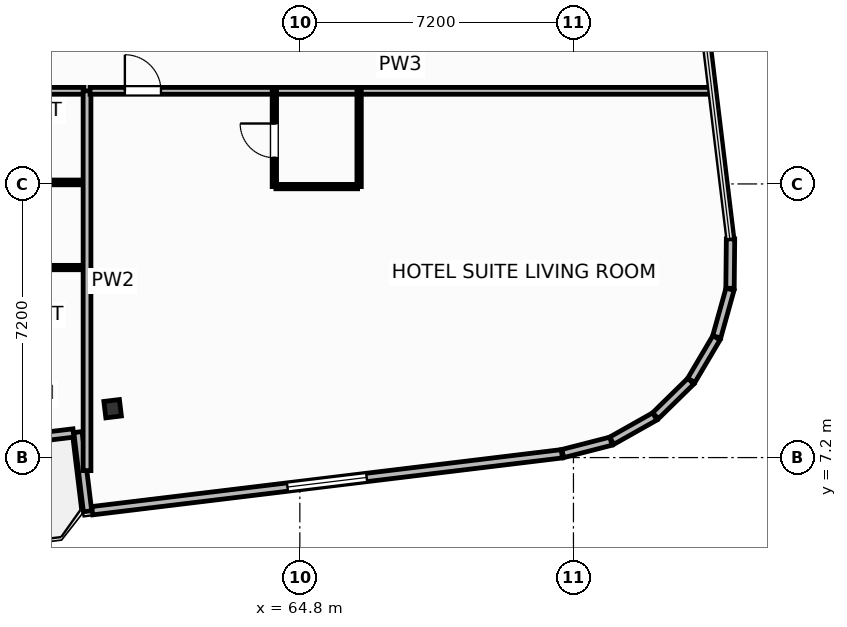
"""IFC4 building model, lengths in metres.
Left out: names, types, materials, properties, quantities, classifications, styles, units other than length and angle.
Written with IfcOpenShell. Run it as: python <this file> out.ifc"""

import sys

from ifc_helpers import new_model, si_unit, direction, frame, frame_2d, origin, origin_2d, place, context, subcontext, project, spatial, rectangle, i_section, extrude, element, fill, save


model = new_model("IFC4")
c1 = context("Model", 3, precision=1e-05, world=origin(), true_north=direction((0.0, 1.0)))
c2 = subcontext(c1, "Body", "Model", "MODEL_VIEW")
j1 = project(units=[si_unit("LENGTHUNIT", "METRE"), si_unit("PLANEANGLEUNIT", "RADIAN")], contexts=[c1])
p1 = place(None, origin())
s1 = spatial("IfcSite", under=j1, at=p1, CompositionType="ELEMENT")
p2 = place(p1, origin())
s2 = spatial("IfcBuilding", under=s1, at=p2, CompositionType="ELEMENT")
p3 = place(p2, frame((0.0, 0.0, 170.9)))
s3 = spatial("IfcBuildingStorey", under=s2, at=p3, CompositionType="ELEMENT", Elevation=170.9)
p4 = place(p3, frame((59.874, 8.486, 0.0), z_axis=(0.0, 0.0, 1.0), x_axis=(0.992732158755, 0.12034475881, 0.0)))
e1 = element("IfcColumn", 1, at=p4, inside=s3, PredefinedType="COLUMN", context=c2, shape_type="SweptSolid", body=[
    extrude(i_section(OverallWidth=0.412, OverallDepth=0.435, WebThickness=0.036, FlangeThickness=0.057, FilletRadius=0.025, at=origin_2d()), origin(), (0.0, 0.0, 1.0), 3.7),
])
p5 = place(p3, frame((58.843, 7.847, 0.0), z_axis=(0.0, 0.0, 1.0), x_axis=(-0.992729951822, -0.120362962556, 0.0)))
e2 = element("IfcWall", 2, at=p5, inside=s3, PredefinedType="SOLIDWALL", context=c2, shape_type="SweptSolid", body=[
    extrude(rectangle(XDim=6.0, YDim=0.22, at=frame_2d((3.0, 0.0))), origin(), (0.0, 0.0, 1.0), 2.73),
])
p6 = place(p5, frame((1.144, 0.0, 0.0)))
e3 = element("IfcOpeningElement", 3, at=p6, cuts=e2, PredefinedType="OPENING", context=c2, shape_type="SweptSolid", body=[
    extrude(rectangle(XDim=2.1, YDim=2.3, at=frame_2d((1.05, 1.15))), frame((0.0, 0.12, 0.0), z_axis=(0.0, -1.0, 0.0), x_axis=(1.0, 0.0, 0.0)), (0.0, 0.0, 1.0), 0.24),
])
p7 = place(p3, frame((58.961, 7.872, 0.0), z_axis=(0.0, 0.0, 1.0), x_axis=(0.120327895535, -0.992734202874, 0.0)))
e4 = element("IfcWall", 4, at=p7, inside=s3, PredefinedType="SOLIDWALL", context=c2, shape_type="SweptSolid", body=[
    extrude(rectangle(XDim=2.1, YDim=0.22, at=frame_2d((1.05, 0.0))), origin(), (0.0, 0.0, 1.0), 2.73),
])
p8 = place(p3, frame((59.338, 5.802, 0.0), z_axis=(0.0, 0.0, 1.0), x_axis=(0.992731225757, 0.120352454927, 0.0)))
e5 = element("IfcWall", 5, at=p8, inside=s3, PredefinedType="SOLIDWALL", context=c2, shape_type="SweptSolid", body=[
    extrude(rectangle(XDim=12.447, YDim=0.22, at=frame_2d((6.224, 0.0))), origin(), (0.0, 0.0, 1.0), 2.73),
])
p9 = place(p8, frame((5.174, 0.0, 0.8)))
e6 = element("IfcOpeningElement", 6, at=p9, cuts=e5, PredefinedType="OPENING", context=c2, shape_type="SweptSolid", body=[
    extrude(rectangle(XDim=2.1, YDim=1.75, at=frame_2d((1.05, 0.875))), frame((0.0, 0.12, 0.0), z_axis=(0.0, -1.0, 0.0), x_axis=(1.0, 0.0, 0.0)), (0.0, 0.0, 1.0), 0.24),
])
p10 = place(p3, frame((71.719, 7.306, 0.0), z_axis=(0.0, 0.0, 1.0), x_axis=(0.968541764193, 0.248851061909, 0.0)))
e7 = element("IfcWall", 7, at=p10, inside=s3, PredefinedType="SOLIDWALL", context=c2, shape_type="SweptSolid", body=[
    extrude(rectangle(XDim=1.309, YDim=0.22, at=frame_2d((0.654, 0.0))), origin(), (0.0, 0.0, 1.0), 2.73),
])
for number, where, z_axis, x_axis in (
    (8, (73.008, 7.644, 0.0), (0.0, 0.0, 1.0), (0.871, 0.491, 0.0)),
    (9, (74.159, 8.3, 0.0), (0.0, 0.0, 1.0), (0.714, 0.7, 0.0)),
    (10, (75.101, 9.232, 0.0), (0.0, 0.0, 1.0), (0.509, 0.861, 0.0)),
    (11, (75.77, 10.376, 0.0), (0.0, 0.0, 1.0), (0.269, 0.963, 0.0)),
):
    element("IfcWall", number, at=place(p3, frame(where, z_axis=z_axis, x_axis=x_axis)), inside=s3, PredefinedType="SOLIDWALL", context=c2, shape_type="SweptSolid", body=[
        extrude(rectangle(XDim=1.301, YDim=0.22, at=frame_2d((0.65, 0.0))), origin(), (0.0, 0.0, 1.0), 2.73),
    ])
p11 = place(p3, frame((76.12, 11.654, 0.0), z_axis=(0.0, 0.0, 1.0), x_axis=(0.01032033607, 0.999946743914, 0.0)))
e12 = element("IfcWall", 12, at=p11, inside=s3, PredefinedType="SOLIDWALL", context=c2, shape_type="SweptSolid", body=[
    extrude(rectangle(XDim=1.301, YDim=0.22, at=frame_2d((0.65, 0.0))), origin(), (0.0, 0.0, 1.0), 2.73),
])
p12 = place(p3, frame((48.48, 16.85, 0.0), z_axis=(0.0, 0.0, 1.0), x_axis=(1.0, 0.0, 0.0)))
e13 = element("IfcWall", 13, at=p12, inside=s3, PredefinedType="PARTITIONING", context=c2, shape_type="SweptSolid", body=[
    extrude(rectangle(XDim=10.64, YDim=0.18, at=frame_2d((5.32, 0.0))), origin(), (0.0, 0.0, 1.0), 3.45),
])
p13 = place(p12, frame((2.535, 0.0, 0.0)))
e14 = element("IfcOpeningElement", 14, at=p13, cuts=e13, PredefinedType="OPENING", context=c2, shape_type="SweptSolid", body=[
    extrude(rectangle(XDim=1.0, YDim=2.2, at=frame_2d((0.5, 1.1))), frame((0.0, 0.1, 0.0), z_axis=(0.0, -1.0, 0.0), x_axis=(1.0, 0.0, 0.0)), (0.0, 0.0, 1.0), 0.2),
])
p14 = place(p3, frame((54.689, 14.44, 0.0), z_axis=(0.0, 0.0, 1.0), x_axis=(1.0, 0.0, 0.0)))
e15 = element("IfcWall", 15, at=p14, inside=s3, PredefinedType="PARTITIONING", context=c2, shape_type="SweptSolid", body=[
    extrude(rectangle(XDim=4.431, YDim=0.125, at=frame_2d((2.215, 0.0))), origin(), (0.0, 0.0, 1.0), 3.45),
])
p15 = place(p3, frame((54.689, 12.2, 0.0), z_axis=(0.0, 0.0, 1.0), x_axis=(1.0, 0.0, 0.0)))
e16 = element("IfcWall", 16, at=p15, inside=s3, PredefinedType="PARTITIONING", context=c2, shape_type="SweptSolid", body=[
    extrude(rectangle(XDim=4.431, YDim=0.115, at=frame_2d((2.215, 0.0))), origin(), (0.0, 0.0, 1.0), 3.45),
])
p16 = place(p3, frame((59.2, 6.856, 0.0), z_axis=(0.0, 0.0, 1.0), x_axis=(0.0, 1.0, 0.0)))
e17 = element("IfcWall", 17, at=p16, inside=s3, PredefinedType="PARTITIONING", context=c2, shape_type="SweptSolid", body=[
    extrude(rectangle(XDim=9.994, YDim=0.205, at=frame_2d((4.997, 0.0))), origin(), (0.0, 0.0, 1.0), 3.45),
])
p17 = place(p3, frame((59.28, 16.85, 0.0), z_axis=(0.0, 0.0, 1.0), x_axis=(1.0, 0.0, 0.0)))
e18 = element("IfcWall", 18, at=p17, inside=s3, PredefinedType="PARTITIONING", context=c2, shape_type="SweptSolid", body=[
    extrude(rectangle(XDim=16.322, YDim=0.18, at=frame_2d((8.161, 0.0))), origin(), (0.0, 0.0, 1.0), 3.45),
])
p18 = place(p17, frame((0.916, 0.0, 0.0)))
e19 = element("IfcOpeningElement", 19, at=p18, cuts=e18, PredefinedType="OPENING", context=c2, shape_type="SweptSolid", body=[
    extrude(rectangle(XDim=0.95, YDim=2.15, at=frame_2d((0.475, 1.075))), frame((0.0, 0.1, 0.0), z_axis=(0.0, -1.0, 0.0), x_axis=(1.0, 0.0, 0.0)), (0.0, 0.0, 1.0), 0.2),
])
p19 = place(p3, frame((64.17, 14.33, 0.0), z_axis=(0.0, 0.0, 1.0), x_axis=(1.0, 0.0, 0.0)))
e20 = element("IfcWall", 20, at=p19, inside=s3, PredefinedType="PARTITIONING", context=c2, shape_type="SweptSolid", body=[
    extrude(rectangle(XDim=2.15, YDim=0.115, at=frame_2d((1.075, 0.0))), origin(), (0.0, 0.0, 1.0), 3.45),
])
p20 = place(p3, frame((64.13, 14.33, 0.0), z_axis=(0.0, 0.0, 1.0), x_axis=(0.0, 1.0, 0.0)))
e21 = element("IfcWall", 21, at=p20, inside=s3, PredefinedType="PARTITIONING", context=c2, shape_type="SweptSolid", body=[
    extrude(rectangle(XDim=2.52, YDim=0.115, at=frame_2d((1.26, 0.0))), origin(), (0.0, 0.0, 1.0), 3.45),
])
p21 = place(p20, frame((0.76, 0.0, 0.0)))
e22 = element("IfcOpeningElement", 22, at=p21, cuts=e21, PredefinedType="OPENING", context=c2, shape_type="SweptSolid", body=[
    extrude(rectangle(XDim=0.9, YDim=2.05, at=frame_2d((0.45, 1.025))), frame((0.0, 0.067, 0.0), z_axis=(0.0, -1.0, 0.0), x_axis=(1.0, 0.0, 0.0)), (0.0, 0.0, 1.0), 0.135),
])
p22 = place(p3, frame((66.36, 14.33, 0.0), z_axis=(0.0, 0.0, 1.0), x_axis=(0.0, 1.0, 0.0)))
e23 = element("IfcWall", 23, at=p22, inside=s3, PredefinedType="PARTITIONING", context=c2, shape_type="SweptSolid", body=[
    extrude(rectangle(XDim=2.52, YDim=0.115, at=frame_2d((1.26, 0.0))), origin(), (0.0, 0.0, 1.0), 3.45),
])
p23 = place(p9, origin())
e24 = element("IfcWindow", 24, at=p23, inside=s3, PartitioningType="SINGLE_PANEL", PredefinedType="WINDOW", context=c2, shape_type="SweptSolid", body=[
    extrude(rectangle(XDim=2.1, YDim=1.75, at=frame_2d((1.05, 0.875))), frame((0.0, 0.03, 0.0), z_axis=(0.0, -1.0, 0.0), x_axis=(1.0, 0.0, 0.0)), (0.0, 0.0, 1.0), 0.06),
])
fill(e6, e24)
p24 = place(p18, origin())
e25 = element("IfcDoor", 25, at=p24, inside=s3, OperationType="SINGLE_SWING_LEFT", PredefinedType="DOOR", context=c2, shape_type="SweptSolid", body=[
    extrude(rectangle(XDim=0.95, YDim=2.15, at=frame_2d((0.475, 1.075))), frame((0.0, 0.025, 0.0), z_axis=(0.0, -1.0, 0.0), x_axis=(1.0, 0.0, 0.0)), (0.0, 0.0, 1.0), 0.05),
])
fill(e19, e25)
p25 = place(p21, origin())
e26 = element("IfcDoor", 26, at=p25, inside=s3, OperationType="SINGLE_SWING_RIGHT", PredefinedType="DOOR", context=c2, shape_type="SweptSolid", body=[
    extrude(rectangle(XDim=0.9, YDim=2.05, at=frame_2d((0.45, 1.025))), frame((0.0, 0.025, 0.0), z_axis=(0.0, -1.0, 0.0), x_axis=(1.0, 0.0, 0.0)), (0.0, 0.0, 1.0), 0.05),
])
fill(e22, e26)
save(model, sys.argv[1])
